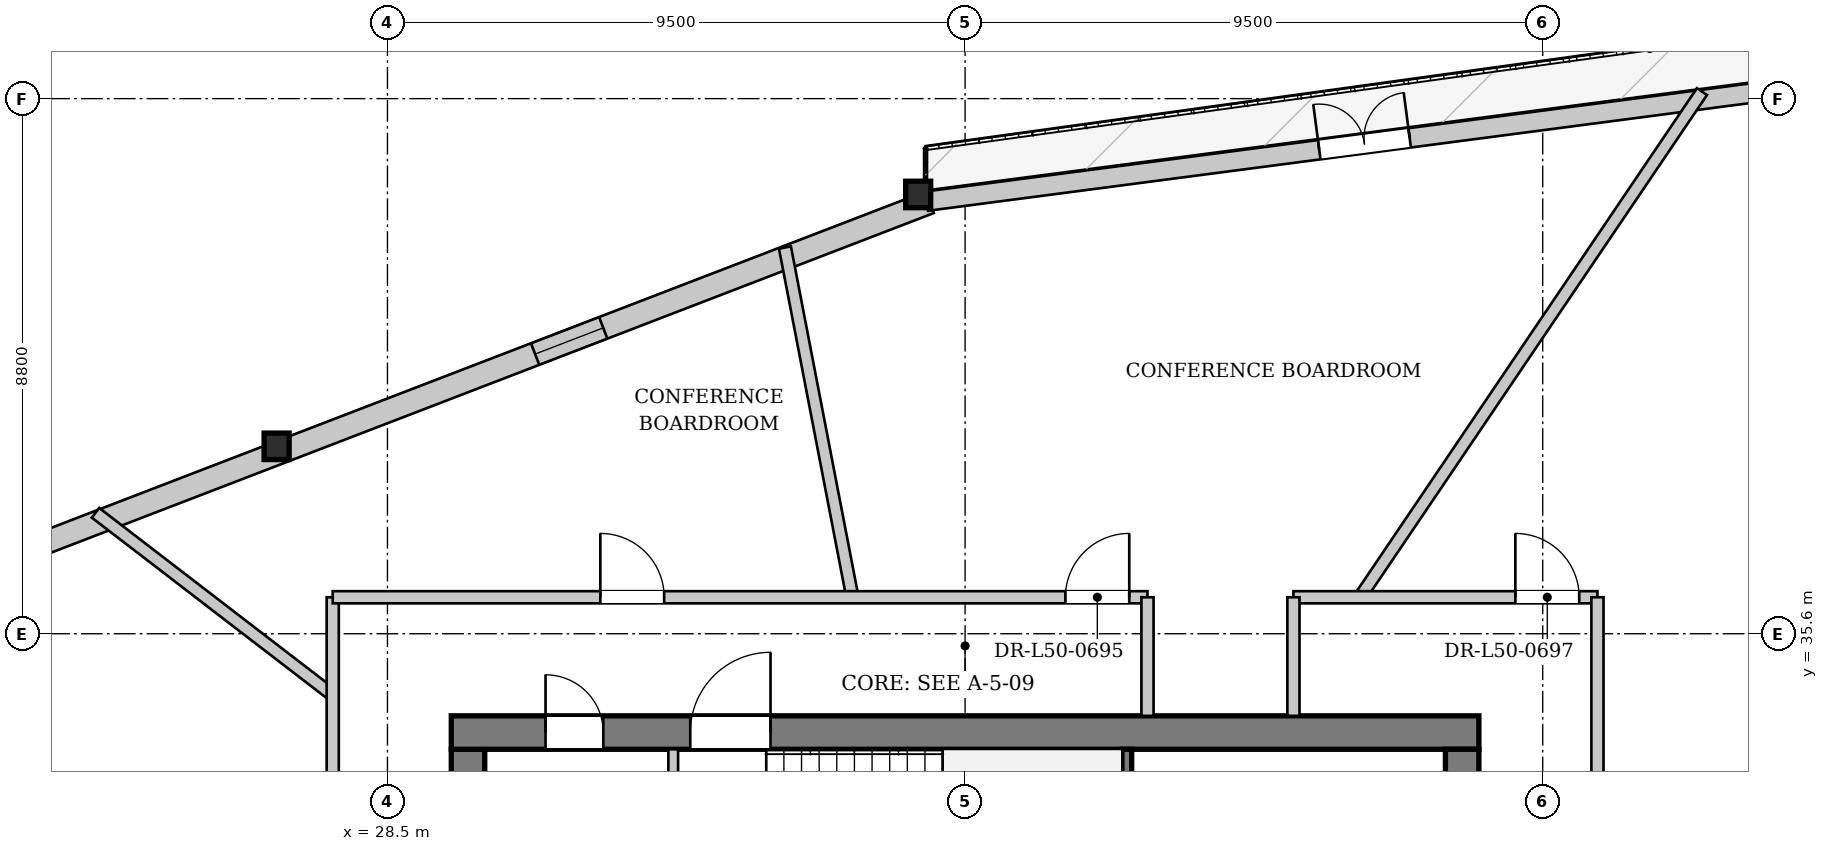
"""IFC4 building model, lengths in metres.
Left out: names, types, materials, properties, quantities, classifications, styles, units other than length and angle.
Written with IfcOpenShell. Run it as: python <this file> out.ifc"""

import sys

from ifc_helpers import new_model, si_unit, direction, frame, frame_2d, origin, origin_2d, place, context, subcontext, project, spatial, rectangle, i_section, extrude, source, transform, mapped, element, fill, save


model = new_model("IFC4")
c1 = context("Model", 3, precision=1e-05, world=origin(), true_north=direction((0.0, 1.0)))
c2 = subcontext(c1, "Body", "Model", "MODEL_VIEW")
j1 = project(units=[si_unit("LENGTHUNIT", "METRE"), si_unit("PLANEANGLEUNIT", "RADIAN")], contexts=[c1])
p1 = place(None, origin())
s1 = spatial("IfcSite", under=j1, at=p1, CompositionType="ELEMENT")
p2 = place(p1, origin())
s2 = spatial("IfcBuilding", under=s1, at=p2, CompositionType="ELEMENT")
p3 = place(p2, frame((0.0, 0.0, 189.2)))
s3 = spatial("IfcBuildingStorey", under=s2, at=p3, CompositionType="ELEMENT", Elevation=189.2)
m1 = source(origin(), c2, "Body", "SweptSolid", [
    extrude(i_section(OverallWidth=0.412, OverallDepth=0.435, WebThickness=0.031, FlangeThickness=0.05, at=origin_2d()), origin(), (0.0, 0.0, 1.0), 3.395),
])
p4 = place(p3, frame((37.349, 42.873, 0.0), z_axis=(-0.071192017009, -0.028764451317, 0.997047793767), x_axis=(0.374617894384, -0.927179288599, 0.0)))
e1 = element("IfcColumn", 1, at=p4, inside=s3, PredefinedType="COLUMN", context=c2, shape_type="MappedRepresentation", body=[
    mapped(m1, transform((0.0, 0.0, 0.0), x_axis=(1.0, 0.0, 0.0), y_axis=(0.0, 1.0, 0.0), z_axis=(0.0, 0.0, 1.0), scale=1.0)),
])
m2 = source(origin(), c2, "Body", "SweptSolid", [
    extrude(i_section(OverallWidth=0.412, OverallDepth=0.435, WebThickness=0.031, FlangeThickness=0.05, at=origin_2d()), origin(), (0.0, 0.0, 1.0), 3.397),
])
p5 = place(p3, frame((26.763, 38.8, 0.0), z_axis=(-0.050587437703, -0.069485869686, 0.996299465553), x_axis=(0.808446763279, -0.58856930853, 0.0)))
e2 = element("IfcColumn", 2, at=p5, inside=s3, PredefinedType="COLUMN", context=c2, shape_type="MappedRepresentation", body=[
    mapped(m2, transform((0.0, 0.0, 0.0), x_axis=(1.0, 0.0, 0.0), y_axis=(0.0, 1.0, 0.0), z_axis=(0.0, 0.0, 1.0), scale=1.0)),
])
p6 = place(p3, frame((16.245, 34.55, 0.0), z_axis=(0.0, 0.0, 1.0), x_axis=(0.933308155782, 0.359076435249, 0.0)))
e3 = element("IfcWall", 3, at=p6, inside=s3, PredefinedType="SOLIDWALL", context=c2, shape_type="SweptSolid", body=[
    extrude(rectangle(XDim=22.685, YDim=0.38, at=frame_2d((11.343, 0.0))), origin(), (0.0, 0.0, 1.0), 2.722),
])
p7 = place(p6, frame((5.752, 0.0, 0.65)))
e4 = element("IfcOpeningElement", 4, at=p7, cuts=e3, PredefinedType="OPENING", context=c2, shape_type="SweptSolid", body=[
    extrude(rectangle(XDim=1.2, YDim=1.5, at=frame_2d((0.6, 0.75))), frame((0.0, 0.2, 0.0), z_axis=(0.0, -1.0, 0.0), x_axis=(1.0, 0.0, 0.0)), (0.0, 0.0, 1.0), 0.4),
])
p8 = place(p6, frame((15.733, 0.0, 0.65)))
e5 = element("IfcOpeningElement", 5, at=p8, cuts=e3, PredefinedType="OPENING", context=c2, shape_type="SweptSolid", body=[
    extrude(rectangle(XDim=1.2, YDim=1.5, at=frame_2d((0.6, 0.75))), frame((0.0, 0.2, 0.0), z_axis=(0.0, -1.0, 0.0), x_axis=(1.0, 0.0, 0.0)), (0.0, 0.0, 1.0), 0.4),
])
p9 = place(p3, frame((37.37, 42.715, 0.0), z_axis=(0.0, 0.0, 1.0), x_axis=(0.991528786197, 0.129887128474, 0.0)))
e6 = element("IfcWall", 6, at=p9, inside=s3, PredefinedType="SOLIDWALL", context=c2, shape_type="SweptSolid", body=[
    extrude(rectangle(XDim=22.685, YDim=0.32, at=frame_2d((11.343, 0.0))), origin(), (0.0, 0.0, 1.0), 2.722),
])
p10 = place(p9, frame((6.509, 0.0, 0.0)))
e7 = element("IfcOpeningElement", 7, at=p10, cuts=e6, PredefinedType="OPENING", context=c2, shape_type="SweptSolid", body=[
    extrude(rectangle(XDim=1.5, YDim=2.3, at=frame_2d((0.75, 1.15))), frame((0.0, 0.17, 0.0), z_axis=(0.0, -1.0, 0.0), x_axis=(1.0, 0.0, 0.0)), (0.0, 0.0, 1.0), 0.34),
])
p11 = place(p9, frame((15.487, 0.0, 0.252)))
e8 = element("IfcOpeningElement", 8, at=p11, cuts=e6, PredefinedType="OPENING", context=c2, shape_type="SweptSolid", body=[
    extrude(rectangle(XDim=2.6, YDim=2.35, at=frame_2d((1.3, 1.175))), frame((0.0, 0.17, 0.0), z_axis=(0.0, -1.0, 0.0), x_axis=(1.0, 0.0, 0.0)), (0.0, 0.0, 1.0), 0.34),
])
p12 = place(p3, frame((29.825, 19.5, 0.0), z_axis=(0.0, 0.0, 1.0), x_axis=(0.0, 1.0, 0.0)))
e9 = element("IfcWall", 9, at=p12, inside=s3, PredefinedType="SHEAR", context=c2, shape_type="SweptSolid", body=[
    extrude(rectangle(XDim=14.2, YDim=0.55, at=frame_2d((7.1, 0.0))), origin(), (0.0, 0.0, 1.0), 3.33),
])
p13 = place(p12, frame((7.42, 0.0, 0.0)))
e10 = element("IfcOpeningElement", 10, at=p13, cuts=e9, PredefinedType="OPENING", context=c2, shape_type="SweptSolid", body=[
    extrude(rectangle(XDim=1.6, YDim=2.2, at=frame_2d((0.8, 1.1))), frame((0.0, 0.285, 0.0), z_axis=(0.0, -1.0, 0.0), x_axis=(1.0, 0.0, 0.0)), (0.0, 0.0, 1.0), 0.57),
])
p14 = place(p3, frame((29.55, 33.975, 0.0), z_axis=(0.0, 0.0, 1.0), x_axis=(1.0, 0.0, 0.0)))
e11 = element("IfcWall", 11, at=p14, inside=s3, PredefinedType="SHEAR", context=c2, shape_type="SweptSolid", body=[
    extrude(rectangle(XDim=16.9, YDim=0.55, at=frame_2d((8.45, 0.0))), origin(), (0.0, 0.0, 1.0), 3.33),
])
p15 = place(p14, frame((1.55, 0.0, 0.0)))
e12 = element("IfcOpeningElement", 12, at=p15, cuts=e11, PredefinedType="OPENING", context=c2, shape_type="SweptSolid", body=[
    extrude(rectangle(XDim=0.95, YDim=2.1, at=frame_2d((0.475, 1.05))), frame((0.0, 0.285, 0.0), z_axis=(0.0, -1.0, 0.0), x_axis=(1.0, 0.0, 0.0)), (0.0, 0.0, 1.0), 0.57),
])
p16 = place(p14, frame((3.93, 0.0, 0.0)))
e13 = element("IfcOpeningElement", 13, at=p16, cuts=e11, PredefinedType="OPENING", context=c2, shape_type="SweptSolid", body=[
    extrude(rectangle(XDim=1.32, YDim=2.2, at=frame_2d((0.66, 1.1))), frame((0.0, 0.285, 0.0), z_axis=(0.0, -1.0, 0.0), x_axis=(1.0, 0.0, 0.0)), (0.0, 0.0, 1.0), 0.57),
])
p17 = place(p3, frame((46.175, 33.7, 0.0), z_axis=(0.0, 0.0, 1.0), x_axis=(0.0, -1.0, 0.0)))
e14 = element("IfcWall", 14, at=p17, inside=s3, PredefinedType="SHEAR", context=c2, shape_type="SweptSolid", body=[
    extrude(rectangle(XDim=14.2, YDim=0.55, at=frame_2d((7.1, 0.0))), origin(), (0.0, 0.0, 1.0), 3.33),
])
p18 = place(p17, frame((5.18, 0.0, 0.0)))
e15 = element("IfcOpeningElement", 15, at=p18, cuts=e14, PredefinedType="OPENING", context=c2, shape_type="SweptSolid", body=[
    extrude(rectangle(XDim=1.6, YDim=2.2, at=frame_2d((0.8, 1.1))), frame((0.0, 0.285, 0.0), z_axis=(0.0, -1.0, 0.0), x_axis=(1.0, 0.0, 0.0)), (0.0, 0.0, 1.0), 0.57),
])
p19 = place(p17, frame((2.05, 0.0, 0.0)))
e16 = element("IfcOpeningElement", 16, at=p19, cuts=e14, PredefinedType="OPENING", context=c2, shape_type="SweptSolid", body=[
    extrude(rectangle(XDim=0.95, YDim=2.1, at=frame_2d((0.475, 1.05))), frame((0.0, 0.285, 0.0), z_axis=(0.0, -1.0, 0.0), x_axis=(1.0, 0.0, 0.0)), (0.0, 0.0, 1.0), 0.57),
])
p20 = place(p3, frame((40.66, 30.6, 0.0), z_axis=(0.0, 0.0, 1.0), x_axis=(0.0, 1.0, 0.0)))
e17 = element("IfcWall", 17, at=p20, inside=s3, PredefinedType="PARTITIONING", context=c2, shape_type="SweptSolid", body=[
    extrude(rectangle(XDim=3.1, YDim=0.16, at=frame_2d((1.55, 0.0))), origin(), (0.0, 0.0, 1.0), 3.33),
])
p21 = place(p3, frame((33.2, 28.44, 0.0), z_axis=(0.0, 0.0, 1.0), x_axis=(0.0, 1.0, 0.0)))
e18 = element("IfcWall", 18, at=p21, inside=s3, PredefinedType="PARTITIONING", context=c2, shape_type="SweptSolid", body=[
    extrude(rectangle(XDim=5.26, YDim=0.16, at=frame_2d((2.63, 0.0))), origin(), (0.0, 0.0, 1.0), 3.33),
])
p22 = place(p3, frame((48.4, 31.023, 0.0), z_axis=(0.0, 0.0, 1.0), x_axis=(0.920240648348, 0.391352972556, 0.0)))
e19 = element("IfcWall", 19, at=p22, inside=s3, PredefinedType="PARTITIONING", context=c2, shape_type="SweptSolid", body=[
    extrude(rectangle(XDim=11.029, YDim=0.2, at=frame_2d((5.514, 0.0))), origin(), (0.0, 0.0, 1.0), 3.33),
])
p23 = place(p3, frame((44.494, 36.2, 0.0), z_axis=(0.0, 0.0, 1.0), x_axis=(0.560293666023, 0.828294034637, 0.0)))
e20 = element("IfcWall", 20, at=p23, inside=s3, PredefinedType="PARTITIONING", context=c2, shape_type="SweptSolid", body=[
    extrude(rectangle(XDim=10.04, YDim=0.2, at=frame_2d((5.02, 0.0))), origin(), (0.0, 0.0, 1.0), 3.33),
])
p24 = place(p3, frame((36.147, 36.2, 0.0), z_axis=(0.0, 0.0, 1.0), x_axis=(-0.189474985253, 0.981885548302, 0.0)))
e21 = element("IfcWall", 21, at=p24, inside=s3, PredefinedType="PARTITIONING", context=c2, shape_type="SweptSolid", body=[
    extrude(rectangle(XDim=5.858, YDim=0.2, at=frame_2d((2.929, 0.0))), origin(), (0.0, 0.0, 1.0), 3.33),
])
p25 = place(p3, frame((27.6, 34.591, 0.0), z_axis=(0.0, 0.0, 1.0), x_axis=(-0.792943004207, 0.609295816562, 0.0)))
e22 = element("IfcWall", 22, at=p25, inside=s3, PredefinedType="PARTITIONING", context=c2, shape_type="SweptSolid", body=[
    extrude(rectangle(XDim=4.92, YDim=0.2, at=frame_2d((2.46, 0.0))), origin(), (0.0, 0.0, 1.0), 3.33),
])
p26 = place(p3, frame((27.6, 17.0, 0.0), z_axis=(0.0, 0.0, 1.0), x_axis=(0.0, 1.0, 0.0)))
e23 = element("IfcWall", 23, at=p26, inside=s3, PredefinedType="PARTITIONING", context=c2, shape_type="SweptSolid", body=[
    extrude(rectangle(XDim=19.2, YDim=0.2, at=frame_2d((9.6, 0.0))), origin(), (0.0, 0.0, 1.0), 3.33),
])
p27 = place(p26, frame((15.037, 0.0, 0.0)))
e24 = element("IfcOpeningElement", 24, at=p27, cuts=e23, PredefinedType="OPENING", context=c2, shape_type="SweptSolid", body=[
    extrude(rectangle(XDim=1.05, YDim=2.2, at=frame_2d((0.525, 1.1))), frame((0.0, 0.11, 0.0), z_axis=(0.0, -1.0, 0.0), x_axis=(1.0, 0.0, 0.0)), (0.0, 0.0, 1.0), 0.22),
])
p28 = place(p26, frame((3.635, 0.0, 0.0)))
e25 = element("IfcOpeningElement", 25, at=p28, cuts=e23, PredefinedType="OPENING", context=c2, shape_type="SweptSolid", body=[
    extrude(rectangle(XDim=1.05, YDim=2.2, at=frame_2d((0.525, 1.1))), frame((0.0, 0.11, 0.0), z_axis=(0.0, -1.0, 0.0), x_axis=(1.0, 0.0, 0.0)), (0.0, 0.0, 1.0), 0.22),
])
p29 = place(p3, frame((27.6, 36.2, 0.0), z_axis=(0.0, 0.0, 1.0), x_axis=(1.0, 0.0, 0.0)))
e26 = element("IfcWall", 26, at=p29, inside=s3, PredefinedType="PARTITIONING", context=c2, shape_type="SweptSolid", body=[
    extrude(rectangle(XDim=13.4, YDim=0.2, at=frame_2d((6.7, 0.0))), origin(), (0.0, 0.0, 1.0), 3.33),
])
p30 = place(p29, frame((12.05, 0.0, 0.0)))
e27 = element("IfcOpeningElement", 27, at=p30, cuts=e26, PredefinedType="OPENING", context=c2, shape_type="SweptSolid", body=[
    extrude(rectangle(XDim=1.05, YDim=2.2, at=frame_2d((0.525, 1.1))), frame((0.0, 0.11, 0.0), z_axis=(0.0, -1.0, 0.0), x_axis=(1.0, 0.0, 0.0)), (0.0, 0.0, 1.0), 0.22),
])
p31 = place(p29, frame((4.401, 0.0, 0.0)))
e28 = element("IfcOpeningElement", 28, at=p31, cuts=e26, PredefinedType="OPENING", context=c2, shape_type="SweptSolid", body=[
    extrude(rectangle(XDim=1.05, YDim=2.2, at=frame_2d((0.525, 1.1))), frame((0.0, 0.11, 0.0), z_axis=(0.0, -1.0, 0.0), x_axis=(1.0, 0.0, 0.0)), (0.0, 0.0, 1.0), 0.22),
])
p32 = place(p3, frame((41.0, 34.25, 0.0), z_axis=(0.0, 0.0, 1.0), x_axis=(0.0, 1.0, 0.0)))
e29 = element("IfcWall", 29, at=p32, inside=s3, PredefinedType="PARTITIONING", context=c2, shape_type="SweptSolid", body=[
    extrude(rectangle(XDim=1.95, YDim=0.2, at=frame_2d((0.975, 0.0))), origin(), (0.0, 0.0, 1.0), 3.33),
])
p33 = place(p3, frame((43.4, 36.2, 0.0), z_axis=(0.0, 0.0, 1.0), x_axis=(1.0, 0.0, 0.0)))
e30 = element("IfcWall", 30, at=p33, inside=s3, PredefinedType="PARTITIONING", context=c2, shape_type="SweptSolid", body=[
    extrude(rectangle(XDim=5.0, YDim=0.2, at=frame_2d((2.5, 0.0))), origin(), (0.0, 0.0, 1.0), 3.33),
])
p34 = place(p33, frame((3.65, 0.0, 0.0)))
e31 = element("IfcOpeningElement", 31, at=p34, cuts=e30, PredefinedType="OPENING", context=c2, shape_type="SweptSolid", body=[
    extrude(rectangle(XDim=1.05, YDim=2.2, at=frame_2d((0.525, 1.1))), frame((0.0, 0.11, 0.0), z_axis=(0.0, -1.0, 0.0), x_axis=(1.0, 0.0, 0.0)), (0.0, 0.0, 1.0), 0.22),
])
p35 = place(p3, frame((43.4, 34.25, 0.0), z_axis=(0.0, 0.0, 1.0), x_axis=(0.0, 1.0, 0.0)))
e32 = element("IfcWall", 32, at=p35, inside=s3, PredefinedType="PARTITIONING", context=c2, shape_type="SweptSolid", body=[
    extrude(rectangle(XDim=1.95, YDim=0.2, at=frame_2d((0.975, 0.0))), origin(), (0.0, 0.0, 1.0), 3.33),
])
p36 = place(p3, frame((48.4, 17.0, 0.0), z_axis=(0.0, 0.0, 1.0), x_axis=(0.0, 1.0, 0.0)))
e33 = element("IfcWall", 33, at=p36, inside=s3, PredefinedType="PARTITIONING", context=c2, shape_type="SweptSolid", body=[
    extrude(rectangle(XDim=19.2, YDim=0.2, at=frame_2d((9.6, 0.0))), origin(), (0.0, 0.0, 1.0), 3.33),
])
p37 = place(p36, frame((1.632, 0.0, 0.0)))
e34 = element("IfcOpeningElement", 34, at=p37, cuts=e33, PredefinedType="OPENING", context=c2, shape_type="SweptSolid", body=[
    extrude(rectangle(XDim=1.05, YDim=2.2, at=frame_2d((0.525, 1.1))), frame((0.0, 0.11, 0.0), z_axis=(0.0, -1.0, 0.0), x_axis=(1.0, 0.0, 0.0)), (0.0, 0.0, 1.0), 0.22),
])
p38 = place(p36, frame((9.686, 0.0, 0.0)))
e35 = element("IfcOpeningElement", 35, at=p38, cuts=e33, PredefinedType="OPENING", context=c2, shape_type="SweptSolid", body=[
    extrude(rectangle(XDim=1.05, YDim=2.2, at=frame_2d((0.525, 1.1))), frame((0.0, 0.11, 0.0), z_axis=(0.0, -1.0, 0.0), x_axis=(1.0, 0.0, 0.0)), (0.0, 0.0, 1.0), 0.22),
])
m3 = source(origin(), c2, "Body", "SweptSolid", [
    extrude(rectangle(XDim=1.2, YDim=1.5, at=frame_2d((0.6, 0.75))), frame((0.0, 0.03, 0.0), z_axis=(0.0, -1.0, 0.0), x_axis=(1.0, 0.0, 0.0)), (0.0, 0.0, 1.0), 0.06),
])
p39 = place(p8, origin())
e36 = element("IfcWindow", 36, at=p39, inside=s3, PartitioningType="SINGLE_PANEL", PredefinedType="WINDOW", context=c2, shape_type="MappedRepresentation", body=[
    mapped(m3, transform((0.0, 0.0, 0.0), x_axis=(1.0, 0.0, 0.0), y_axis=(0.0, 1.0, 0.0), z_axis=(0.0, 0.0, 1.0), scale=1.0)),
])
fill(e5, e36)
m4 = source(origin(), c2, "Body", "SweptSolid", [
    extrude(rectangle(XDim=1.5, YDim=2.3, at=frame_2d((0.75, 1.15))), frame((0.0, 0.025, 0.0), z_axis=(0.0, -1.0, 0.0), x_axis=(1.0, 0.0, 0.0)), (0.0, 0.0, 1.0), 0.05),
])
p40 = place(p10, origin())
e37 = element("IfcDoor", 37, at=p40, inside=s3, OperationType="DOUBLE_DOOR_SINGLE_SWING", PredefinedType="DOOR", context=c2, shape_type="MappedRepresentation", body=[
    mapped(m4, transform((0.0, 0.0, 0.0), x_axis=(1.0, 0.0, 0.0), y_axis=(0.0, 1.0, 0.0), z_axis=(0.0, 0.0, 1.0), scale=1.0)),
])
fill(e7, e37)
m5 = source(origin(), c2, "Body", "SweptSolid", [
    extrude(rectangle(XDim=0.95, YDim=2.1, at=frame_2d((0.475, 1.05))), frame((0.0, 0.025, 0.0), z_axis=(0.0, -1.0, 0.0), x_axis=(1.0, 0.0, 0.0)), (0.0, 0.0, 1.0), 0.05),
])
p41 = place(p15, origin())
e38 = element("IfcDoor", 38, at=p41, inside=s3, OperationType="SINGLE_SWING_LEFT", PredefinedType="DOOR", context=c2, shape_type="MappedRepresentation", body=[
    mapped(m5, transform((0.0, 0.0, 0.0), x_axis=(1.0, 0.0, 0.0), y_axis=(0.0, 1.0, 0.0), z_axis=(0.0, 0.0, 1.0), scale=1.0)),
])
fill(e12, e38)
m6 = source(origin(), c2, "Body", "SweptSolid", [
    extrude(rectangle(XDim=1.32, YDim=2.2, at=frame_2d((0.66, 1.1))), frame((0.0, 0.025, 0.0), z_axis=(0.0, -1.0, 0.0), x_axis=(1.0, 0.0, 0.0)), (0.0, 0.0, 1.0), 0.05),
])
p42 = place(p16, origin())
e39 = element("IfcDoor", 39, at=p42, inside=s3, OperationType="SINGLE_SWING_RIGHT", PredefinedType="DOOR", context=c2, shape_type="MappedRepresentation", body=[
    mapped(m6, transform((0.0, 0.0, 0.0), x_axis=(1.0, 0.0, 0.0), y_axis=(0.0, 1.0, 0.0), z_axis=(0.0, 0.0, 1.0), scale=1.0)),
])
fill(e13, e39)
m7 = source(origin(), c2, "Body", "SweptSolid", [
    extrude(rectangle(XDim=1.05, YDim=2.2, at=frame_2d((0.525, 1.1))), frame((0.0, 0.025, 0.0), z_axis=(0.0, -1.0, 0.0), x_axis=(1.0, 0.0, 0.0)), (0.0, 0.0, 1.0), 0.05),
])
p43 = place(p30, origin())
e40 = element("IfcDoor", 40, at=p43, inside=s3, OperationType="SINGLE_SWING_RIGHT", PredefinedType="DOOR", context=c2, shape_type="MappedRepresentation", body=[
    mapped(m7, transform((0.0, 0.0, 0.0), x_axis=(1.0, 0.0, 0.0), y_axis=(0.0, 1.0, 0.0), z_axis=(0.0, 0.0, 1.0), scale=1.0)),
])
fill(e27, e40)
p44 = place(p31, origin())
e41 = element("IfcDoor", 41, at=p44, inside=s3, OperationType="SINGLE_SWING_LEFT", PredefinedType="DOOR", context=c2, shape_type="MappedRepresentation", body=[
    mapped(m7, transform((0.0, 0.0, 0.0), x_axis=(1.0, 0.0, 0.0), y_axis=(0.0, 1.0, 0.0), z_axis=(0.0, 0.0, 1.0), scale=1.0)),
])
fill(e28, e41)
p45 = place(p34, origin())
e42 = element("IfcDoor", 42, at=p45, inside=s3, OperationType="SINGLE_SWING_LEFT", PredefinedType="DOOR", context=c2, shape_type="MappedRepresentation", body=[
    mapped(m7, transform((0.0, 0.0, 0.0), x_axis=(1.0, 0.0, 0.0), y_axis=(0.0, 1.0, 0.0), z_axis=(0.0, 0.0, 1.0), scale=1.0)),
])
fill(e31, e42)
save(model, sys.argv[1])
